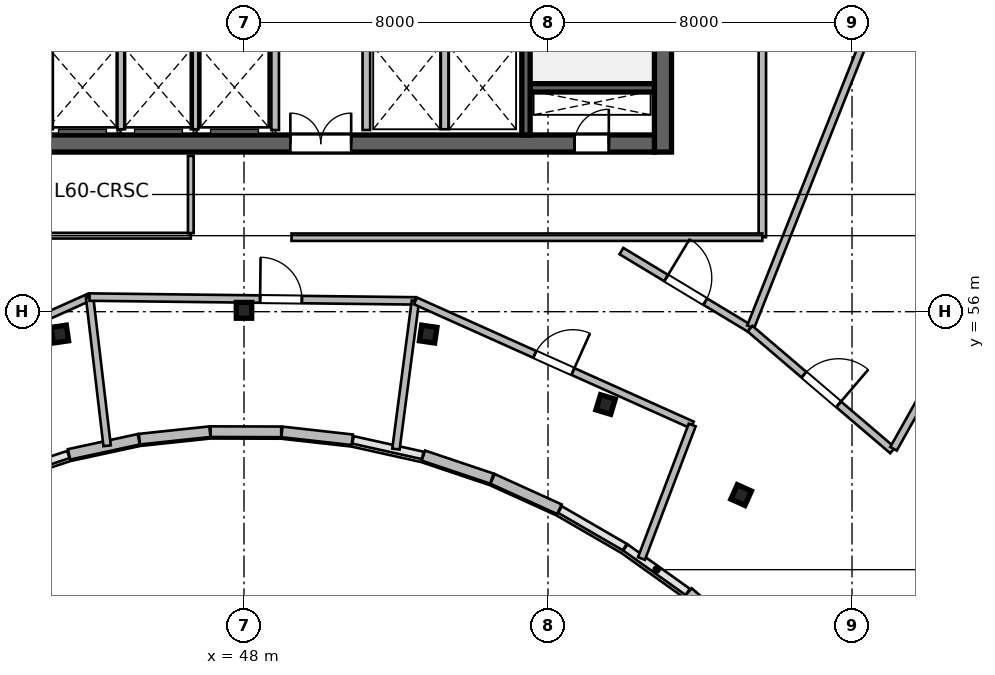
"""IFC4 building model, lengths in metres.
Left out: names, types, materials, properties, quantities, classifications, styles, units other than length and angle.
Written with IfcOpenShell. Run it as: python <this file> out.ifc"""

import sys

from ifc_helpers import new_model, si_unit, direction, frame, frame_2d, origin, origin_2d, place, context, subcontext, project, spatial, rectangle, i_section, extrude, source, transform, mapped, element, fill, save


model = new_model("IFC4")
c1 = context("Model", 3, precision=1e-05, world=origin(), true_north=direction((0.0, 1.0)))
c2 = subcontext(c1, "Body", "Model", "MODEL_VIEW")
j1 = project(units=[si_unit("LENGTHUNIT", "METRE"), si_unit("PLANEANGLEUNIT", "RADIAN")], contexts=[c1])
p1 = place(None, origin())
s1 = spatial("IfcSite", under=j1, at=p1, CompositionType="ELEMENT")
p2 = place(p1, origin())
s2 = spatial("IfcBuilding", under=s1, at=p2, CompositionType="ELEMENT")
p3 = place(p2, frame((0.0, 0.0, 246.9)))
s3 = spatial("IfcBuildingStorey", under=s2, at=p3, CompositionType="ELEMENT", Elevation=246.9)
m1 = source(origin(), c2, "Body", "SweptSolid", [
    extrude(rectangle(XDim=12.0, YDim=0.45, at=frame_2d((6.0, 0.0))), origin(), (0.0, 0.0, 1.0), 3.9),
])
p4 = place(p3, frame((59.025, 60.2, 0.0), z_axis=(0.0, 0.0, 1.0), x_axis=(0.0, 1.0, 0.0)))
e1 = element("IfcWall", 1, at=p4, inside=s3, PredefinedType="SHEAR", context=c2, shape_type="MappedRepresentation", body=[
    mapped(m1, transform((0.0, 0.0, 0.0), scale=1.0)),
])
m2 = source(origin(), c2, "Body", "SweptSolid", [
    extrude(rectangle(XDim=21.6, YDim=0.45, at=frame_2d((10.8, 0.0))), origin(), (0.0, 0.0, 1.0), 3.9),
])
p5 = place(p3, frame((37.2, 60.425, 0.0), z_axis=(0.0, 0.0, 1.0), x_axis=(1.0, 0.0, 0.0)))
e2 = element("IfcWall", 2, at=p5, inside=s3, PredefinedType="SHEAR", context=c2, shape_type="MappedRepresentation", body=[
    mapped(m2, transform((0.0, 0.0, 0.0), scale=1.0)),
])
p6 = place(p5, frame((1.1, 0.0, 0.0)))
e3 = element("IfcOpeningElement", 3, at=p6, cuts=e2, PredefinedType="OPENING", context=c2, shape_type="SweptSolid", body=[
    extrude(rectangle(XDim=1.15, YDim=2.15, at=frame_2d((0.575, 1.075))), frame((0.0, 0.235, 0.0), z_axis=(0.0, -1.0, 0.0), x_axis=(1.0, 0.0, 0.0)), (0.0, 0.0, 1.0), 0.47),
])
p7 = place(p5, frame((19.5, 0.0, 0.0)))
e4 = element("IfcOpeningElement", 4, at=p7, cuts=e2, PredefinedType="OPENING", context=c2, shape_type="SweptSolid", body=[
    extrude(rectangle(XDim=0.9, YDim=2.1, at=frame_2d((0.45, 1.05))), frame((0.0, 0.235, 0.0), z_axis=(0.0, -1.0, 0.0), x_axis=(1.0, 0.0, 0.0)), (0.0, 0.0, 1.0), 0.47),
])
p8 = place(p5, frame((12.02, 0.0, 0.0)))
e5 = element("IfcOpeningElement", 5, at=p8, cuts=e2, PredefinedType="OPENING", context=c2, shape_type="SweptSolid", body=[
    extrude(rectangle(XDim=1.6, YDim=2.15, at=frame_2d((0.8, 1.075))), frame((0.0, 0.235, 0.0), z_axis=(0.0, -1.0, 0.0), x_axis=(1.0, 0.0, 0.0)), (0.0, 0.0, 1.0), 0.47),
])
m3 = source(origin(), c2, "Body", "SweptSolid", [
    extrude(rectangle(XDim=3.27, YDim=0.22, at=frame_2d((1.635, 0.0))), origin(), (0.0, 0.0, 1.0), 3.9),
])
p9 = place(p3, frame((55.53, 61.89, 0.0), z_axis=(0.0, 0.0, 1.0), x_axis=(1.0, 0.0, 0.0)))
e6 = element("IfcWall", 6, at=p9, inside=s3, PredefinedType="SHEAR", context=c2, shape_type="MappedRepresentation", body=[
    mapped(m3, transform((0.0, 0.0, 0.0), scale=1.0)),
])
m4 = source(origin(), c2, "Body", "SweptSolid", [
    extrude(rectangle(XDim=11.1, YDim=0.22, at=frame_2d((5.55, 0.0))), origin(), (0.0, 0.0, 1.0), 3.9),
])
p10 = place(p3, frame((55.42, 60.65, 0.0), z_axis=(0.0, 0.0, 1.0), x_axis=(0.0, 1.0, 0.0)))
e7 = element("IfcWall", 7, at=p10, inside=s3, PredefinedType="SHEAR", context=c2, shape_type="MappedRepresentation", body=[
    mapped(m4, transform((0.0, 0.0, 0.0), scale=1.0)),
])
p11 = place(p10, frame((9.595, 0.0, 0.0)))
e8 = element("IfcOpeningElement", 8, at=p11, cuts=e7, PredefinedType="OPENING", context=c2, shape_type="SweptSolid", body=[
    extrude(rectangle(XDim=1.15, YDim=2.15, at=frame_2d((0.575, 1.075))), frame((0.0, 0.12, 0.0), z_axis=(0.0, -1.0, 0.0), x_axis=(1.0, 0.0, 0.0)), (0.0, 0.0, 1.0), 0.24),
])
m5 = source(origin(), c2, "Body", "SweptSolid", [
    extrude(i_section(OverallWidth=0.406, OverallDepth=0.416, WebThickness=0.03, FlangeThickness=0.048, at=origin_2d()), origin(), (0.0, 0.0, 1.0), 3.9),
])
for number, where, z_axis, x_axis in (
    (9, (43.154, 55.411, 0.0), (0.0, 0.0, 1.0), (-0.143, 0.99, 0.0)),
    (10, (48.0, 56.036, 0.0), (0.0, 0.0, 1.0), (0.0, 1.0, 0.0)),
    (11, (52.846, 55.411, 0.0), (0.0, 0.0, 1.0), (0.143, 0.99, 0.0)),
    (12, (57.515, 53.558, 0.0), (0.0, 0.0, 1.0), (0.289, 0.957, 0.0)),
    (13, (61.082, 51.175, 0.0), (0.0, 0.0, 1.0), (0.409, 0.912, 0.0)),
):
    element("IfcColumn", number, at=place(p3, frame(where, z_axis=z_axis, x_axis=x_axis)), inside=s3, PredefinedType="COLUMN", context=c2, shape_type="MappedRepresentation", body=[
        mapped(m5, transform((0.0, 0.0, 0.0), scale=1.0)),
    ])
m6 = source(origin(), c2, "Body", "SweptSolid", [
    extrude(rectangle(XDim=2.022, YDim=0.28, at=frame_2d((1.011, 0.0))), origin(), (0.0, 0.0, 1.0), 3.65),
])
p12 = place(p3, frame((61.222, 47.299, 0.0), z_axis=(0.0, 0.0, 1.0), x_axis=(-0.758343943716, 0.651854633358, 0.0)))
e14 = element("IfcWall", 14, at=p12, inside=s3, PredefinedType="SOLIDWALL", context=c2, shape_type="MappedRepresentation", body=[
    mapped(m6, transform((0.0, 0.0, 0.0), scale=1.0)),
])
m7 = source(origin(), c2, "Body", "SweptSolid", [
    extrude(rectangle(XDim=1.933, YDim=0.28, at=frame_2d((0.966, 0.0))), origin(), (0.0, 0.0, 1.0), 3.65),
])
p13 = place(p3, frame((56.3, 50.802, 0.0), z_axis=(0.0, 0.0, 1.0), x_axis=(-0.910478916145, 0.413555489936, 0.0)))
e15 = element("IfcWall", 15, at=p13, inside=s3, PredefinedType="SOLIDWALL", context=c2, shape_type="MappedRepresentation", body=[
    mapped(m7, transform((0.0, 0.0, 0.0), scale=1.0)),
])
m8 = source(origin(), c2, "Body", "SweptSolid", [
    extrude(rectangle(XDim=1.901, YDim=0.28, at=frame_2d((0.951, 0.0))), origin(), (0.0, 0.0, 1.0), 3.65),
])
p14 = place(p3, frame((54.523, 51.608, 0.0), z_axis=(0.0, 0.0, 1.0), x_axis=(-0.94793587841, 0.318461254194, 0.0)))
e16 = element("IfcWall", 16, at=p14, inside=s3, PredefinedType="SOLIDWALL", context=c2, shape_type="MappedRepresentation", body=[
    mapped(m8, transform((0.0, 0.0, 0.0), scale=1.0)),
])
m9 = source(origin(), c2, "Body", "SweptSolid", [
    extrude(rectangle(XDim=1.863, YDim=0.28, at=frame_2d((0.932, 0.0))), origin(), (0.0, 0.0, 1.0), 3.65),
])
p15 = place(p3, frame((50.851, 52.63, 0.0), z_axis=(0.0, 0.0, 1.0), x_axis=(-0.9937939307, 0.111236789343, 0.0)))
e17 = element("IfcWall", 17, at=p15, inside=s3, PredefinedType="SOLIDWALL", context=c2, shape_type="MappedRepresentation", body=[
    mapped(m9, transform((0.0, 0.0, 0.0), scale=1.0)),
])
m10 = source(origin(), c2, "Body", "SweptSolid", [
    extrude(rectangle(XDim=1.858, YDim=0.28, at=frame_2d((0.929, 0.0))), origin(), (0.0, 0.0, 1.0), 3.65),
])
p16 = place(p3, frame((48.979, 52.838, 0.0), z_axis=(0.0, 0.0, 1.0), x_axis=(-0.999995433965, 0.003021928128, 0.0)))
e18 = element("IfcWall", 18, at=p16, inside=s3, PredefinedType="SOLIDWALL", context=c2, shape_type="MappedRepresentation", body=[
    mapped(m10, transform((0.0, 0.0, 0.0), scale=1.0)),
])
m11 = source(origin(), c2, "Body", "SweptSolid", [
    extrude(rectangle(XDim=1.862, YDim=0.28, at=frame_2d((0.931, 0.0))), origin(), (0.0, 0.0, 1.0), 3.65),
])
p17 = place(p3, frame((47.102, 52.842, 0.0), z_axis=(0.0, 0.0, 1.0), x_axis=(-0.994430497743, -0.1053944266, 0.0)))
e19 = element("IfcWall", 19, at=p17, inside=s3, PredefinedType="SOLIDWALL", context=c2, shape_type="MappedRepresentation", body=[
    mapped(m11, transform((0.0, 0.0, 0.0), scale=1.0)),
])
m12 = source(origin(), c2, "Body", "SweptSolid", [
    extrude(rectangle(XDim=1.877, YDim=0.28, at=frame_2d((0.938, 0.0))), origin(), (0.0, 0.0, 1.0), 3.65),
])
p18 = place(p3, frame((45.231, 52.643, 0.0), z_axis=(0.0, 0.0, 1.0), x_axis=(-0.97737202312, -0.211527606761, 0.0)))
e20 = element("IfcWall", 20, at=p18, inside=s3, PredefinedType="SOLIDWALL", context=c2, shape_type="MappedRepresentation", body=[
    mapped(m12, transform((0.0, 0.0, 0.0), scale=1.0)),
])
m13 = source(origin(), c2, "Body", "SweptSolid", [
    extrude(rectangle(XDim=2.24, YDim=0.2, at=frame_2d((1.12, 0.0))), origin(), (0.0, 0.0, 1.0), 3.65),
])
for number, where, z_axis, x_axis in (
    (21, (48.82, 60.78, 0.0), (0.0, 0.0, 1.0), (0.0, 1.0, 0.0)),
    (22, (51.22, 60.78, 0.0), (0.0, 0.0, 1.0), (0.0, 1.0, 0.0)),
):
    element("IfcWall", number, at=place(p3, frame(where, z_axis=z_axis, x_axis=x_axis)), inside=s3, PredefinedType="SOLIDWALL", context=c2, shape_type="MappedRepresentation", body=[
        mapped(m13, transform((0.0, 0.0, 0.0), scale=1.0)),
    ])
m14 = source(origin(), c2, "Body", "SweptSolid", [
    extrude(rectangle(XDim=2.2, YDim=0.2, at=frame_2d((1.1, 0.0))), origin(), (0.0, 0.0, 1.0), 3.65),
])
for number, where, z_axis, x_axis in (
    (23, (42.87, 60.8, 0.0), (0.0, 0.0, 1.0), (0.0, 1.0, 0.0)),
    (24, (44.77, 60.8, 0.0), (0.0, 0.0, 1.0), (0.0, 1.0, 0.0)),
    (25, (46.7, 60.8, 0.0), (0.0, 0.0, 1.0), (0.0, 1.0, 0.0)),
    (26, (53.28, 60.8, 0.0), (0.0, 0.0, 1.0), (0.0, 1.0, 0.0)),
):
    element("IfcWall", number, at=place(p3, frame(where, z_axis=z_axis, x_axis=x_axis)), inside=s3, PredefinedType="SOLIDWALL", context=c2, shape_type="MappedRepresentation", body=[
        mapped(m14, transform((0.0, 0.0, 0.0), scale=1.0)),
    ])
m15 = source(origin(), c2, "Body", "SweptSolid", [
    extrude(rectangle(XDim=5.4, YDim=0.15, at=frame_2d((2.7, 0.0))), origin(), (0.0, 0.0, 1.0), 3.65),
])
p19 = place(p3, frame((41.2, 58.0, 0.0), z_axis=(0.0, 0.0, 1.0), x_axis=(1.0, 0.0, 0.0)))
e27 = element("IfcWall", 27, at=p19, inside=s3, PredefinedType="PARTITIONING", context=c2, shape_type="MappedRepresentation", body=[
    mapped(m15, transform((0.0, 0.0, 0.0), scale=1.0)),
])
m16 = source(origin(), c2, "Body", "SweptSolid", [
    extrude(rectangle(XDim=2.033, YDim=0.15, at=frame_2d((1.016, 0.0))), origin(), (0.0, 0.0, 1.0), 3.65),
])
p20 = place(p3, frame((46.6, 58.067, 0.0), z_axis=(0.0, 0.0, 1.0), x_axis=(0.0, 1.0, 0.0)))
e28 = element("IfcWall", 28, at=p20, inside=s3, PredefinedType="PARTITIONING", context=c2, shape_type="MappedRepresentation", body=[
    mapped(m16, transform((0.0, 0.0, 0.0), scale=1.0)),
])
m17 = source(origin(), c2, "Body", "SweptSolid", [
    extrude(rectangle(XDim=8.913, YDim=0.195, at=frame_2d((4.457, 0.0))), origin(), (0.0, 0.0, 1.0), 3.65),
])
p21 = place(p3, frame((35.803, 52.738, 0.0), z_axis=(0.0, 0.0, 1.0), x_axis=(0.912488521546, 0.409102307555, 0.0)))
e29 = element("IfcWall", 29, at=p21, inside=s3, PredefinedType="PARTITIONING", context=c2, shape_type="MappedRepresentation", body=[
    mapped(m17, transform((0.0, 0.0, 0.0), scale=1.0)),
])
p22 = place(p21, frame((3.906, 0.0, 0.0)))
e30 = element("IfcOpeningElement", 30, at=p22, cuts=e29, PredefinedType="OPENING", context=c2, shape_type="SweptSolid", body=[
    extrude(rectangle(XDim=1.1, YDim=2.15, at=frame_2d((0.55, 1.075))), frame((0.0, 0.107, 0.0), z_axis=(0.0, -1.0, 0.0), x_axis=(1.0, 0.0, 0.0)), (0.0, 0.0, 1.0), 0.215),
])
m18 = source(origin(), c2, "Body", "SweptSolid", [
    extrude(rectangle(XDim=3.939, YDim=0.195, at=frame_2d((1.969, 0.0))), origin(), (0.0, 0.0, 1.0), 3.65),
])
p23 = place(p3, frame((44.398, 52.473, 0.0), z_axis=(0.0, 0.0, 1.0), x_axis=(-0.117395053494, 0.993085294129, 0.0)))
e31 = element("IfcWall", 31, at=p23, inside=s3, PredefinedType="PARTITIONING", context=c2, shape_type="MappedRepresentation", body=[
    mapped(m18, transform((0.0, 0.0, 0.0), scale=1.0)),
])
m19 = source(origin(), c2, "Body", "SweptSolid", [
    extrude(rectangle(XDim=8.576, YDim=0.195, at=frame_2d((4.288, 0.0))), origin(), (0.0, 0.0, 1.0), 3.65),
])
p24 = place(p3, frame((43.936, 56.385, 0.0), z_axis=(0.0, 0.0, 1.0), x_axis=(0.999931553434, -0.011699933624, 0.0)))
e32 = element("IfcWall", 32, at=p24, inside=s3, PredefinedType="PARTITIONING", context=c2, shape_type="MappedRepresentation", body=[
    mapped(m19, transform((0.0, 0.0, 0.0), scale=1.0)),
])
p25 = place(p24, frame((4.488, 0.0, 0.0)))
e33 = element("IfcOpeningElement", 33, at=p25, cuts=e32, PredefinedType="OPENING", context=c2, shape_type="SweptSolid", body=[
    extrude(rectangle(XDim=1.1, YDim=2.15, at=frame_2d((0.55, 1.075))), frame((0.0, 0.107, 0.0), z_axis=(0.0, -1.0, 0.0), x_axis=(1.0, 0.0, 0.0)), (0.0, 0.0, 1.0), 0.215),
])
m20 = source(origin(), c2, "Body", "SweptSolid", [
    extrude(rectangle(XDim=3.932, YDim=0.195, at=frame_2d((1.966, 0.0))), origin(), (0.0, 0.0, 1.0), 3.65),
])
p26 = place(p3, frame((51.998, 52.385, 0.0), z_axis=(0.0, 0.0, 1.0), x_axis=(0.130504299366, 0.991447743377, 0.0)))
e34 = element("IfcWall", 34, at=p26, inside=s3, PredefinedType="PARTITIONING", context=c2, shape_type="MappedRepresentation", body=[
    mapped(m20, transform((0.0, 0.0, 0.0), scale=1.0)),
])
m21 = source(origin(), c2, "Body", "SweptSolid", [
    extrude(rectangle(XDim=7.982, YDim=0.195, at=frame_2d((3.991, 0.0))), origin(), (0.0, 0.0, 1.0), 3.65),
])
p27 = place(p3, frame((52.511, 56.284, 0.0), z_axis=(0.0, 0.0, 1.0), x_axis=(0.91248609472, -0.409107720464, 0.0)))
e35 = element("IfcWall", 35, at=p27, inside=s3, PredefinedType="PARTITIONING", context=c2, shape_type="MappedRepresentation", body=[
    mapped(m21, transform((0.0, 0.0, 0.0), scale=1.0)),
])
p28 = place(p27, frame((3.441, 0.0, 0.0)))
e36 = element("IfcOpeningElement", 36, at=p28, cuts=e35, PredefinedType="OPENING", context=c2, shape_type="SweptSolid", body=[
    extrude(rectangle(XDim=1.1, YDim=2.15, at=frame_2d((0.55, 1.075))), frame((0.0, 0.107, 0.0), z_axis=(0.0, -1.0, 0.0), x_axis=(1.0, 0.0, 0.0)), (0.0, 0.0, 1.0), 0.215),
])
m22 = source(origin(), c2, "Body", "SweptSolid", [
    extrude(rectangle(XDim=3.757, YDim=0.195, at=frame_2d((1.879, 0.0))), origin(), (0.0, 0.0, 1.0), 3.65),
])
p29 = place(p3, frame((58.459, 49.507, 0.0), z_axis=(0.0, 0.0, 1.0), x_axis=(0.355427833237, 0.93470372598, 0.0)))
e37 = element("IfcWall", 37, at=p29, inside=s3, PredefinedType="PARTITIONING", context=c2, shape_type="MappedRepresentation", body=[
    mapped(m22, transform((0.0, 0.0, 0.0), scale=1.0)),
])
m23 = source(origin(), c2, "Body", "SweptSolid", [
    extrude(rectangle(XDim=3.951, YDim=0.195, at=frame_2d((1.975, 0.0))), origin(), (0.0, 0.0, 1.0), 3.65),
])
p30 = place(p3, frame((57.932, 57.596, 0.0), z_axis=(0.0, 0.0, 1.0), x_axis=(0.856137696849, -0.51674775668, 0.0)))
e38 = element("IfcWall", 38, at=p30, inside=s3, PredefinedType="PARTITIONING", context=c2, shape_type="MappedRepresentation", body=[
    mapped(m23, transform((0.0, 0.0, 0.0), scale=1.0)),
])
p31 = place(p30, frame((1.375, 0.0, 0.0)))
e39 = element("IfcOpeningElement", 39, at=p31, cuts=e38, PredefinedType="OPENING", context=c2, shape_type="SweptSolid", body=[
    extrude(rectangle(XDim=1.2, YDim=2.15, at=frame_2d((0.6, 1.075))), frame((0.0, 0.107, 0.0), z_axis=(0.0, -1.0, 0.0), x_axis=(1.0, 0.0, 0.0)), (0.0, 0.0, 1.0), 0.215),
])
m24 = source(origin(), c2, "Body", "SweptSolid", [
    extrude(rectangle(XDim=18.471, YDim=0.195, at=frame_2d((9.235, 0.0))), origin(), (0.0, 0.0, 1.0), 3.65),
])
p32 = place(p3, frame((61.333, 55.602, 0.0), z_axis=(0.0, 0.0, 1.0), x_axis=(0.368827756565, 0.929497760076, 0.0)))
e40 = element("IfcWall", 40, at=p32, inside=s3, PredefinedType="PARTITIONING", context=c2, shape_type="MappedRepresentation", body=[
    mapped(m24, transform((0.0, 0.0, 0.0), scale=1.0)),
])
m25 = source(origin(), c2, "Body", "SweptSolid", [
    extrude(rectangle(XDim=4.935, YDim=0.195, at=frame_2d((2.467, 0.0))), origin(), (0.0, 0.0, 1.0), 3.65),
])
p33 = place(p3, frame((61.314, 55.554, 0.0), z_axis=(0.0, 0.0, 1.0), x_axis=(0.760547222161, -0.649282621716, 0.0)))
e41 = element("IfcWall", 41, at=p33, inside=s3, PredefinedType="PARTITIONING", context=c2, shape_type="MappedRepresentation", body=[
    mapped(m25, transform((0.0, 0.0, 0.0), scale=1.0)),
])
p34 = place(p33, frame((1.867, 0.0, 0.0)))
e42 = element("IfcOpeningElement", 42, at=p34, cuts=e41, PredefinedType="OPENING", context=c2, shape_type="SweptSolid", body=[
    extrude(rectangle(XDim=1.2, YDim=2.15, at=frame_2d((0.6, 1.075))), frame((0.0, 0.107, 0.0), z_axis=(0.0, -1.0, 0.0), x_axis=(1.0, 0.0, 0.0)), (0.0, 0.0, 1.0), 0.215),
])
m26 = source(origin(), c2, "Body", "SweptSolid", [
    extrude(rectangle(XDim=17.064, YDim=0.195, at=frame_2d((8.532, 0.0))), origin(), (0.0, 0.0, 1.0), 3.65),
])
p35 = place(p3, frame((65.092, 52.393, 0.0), z_axis=(0.0, 0.0, 1.0), x_axis=(0.490167496501, 0.871628261, 0.0)))
e43 = element("IfcWall", 43, at=p35, inside=s3, PredefinedType="PARTITIONING", context=c2, shape_type="MappedRepresentation", body=[
    mapped(m26, transform((0.0, 0.0, 0.0), scale=1.0)),
])
m27 = source(origin(), c2, "Body", "SweptSolid", [
    extrude(rectangle(XDim=18.567, YDim=0.195, at=frame_2d((9.284, 0.0))), origin(), (0.0, 0.0, 1.0), 3.65),
])
p36 = place(p3, frame((61.64, 57.96, 0.0), z_axis=(0.0, 0.0, 1.0), x_axis=(0.0, 1.0, 0.0)))
e44 = element("IfcWall", 44, at=p36, inside=s3, PredefinedType="PARTITIONING", context=c2, shape_type="MappedRepresentation", body=[
    mapped(m27, transform((0.0, 0.0, 0.0), scale=1.0)),
])
m28 = source(origin(), c2, "Body", "SweptSolid", [
    extrude(rectangle(XDim=12.39, YDim=0.195, at=frame_2d((6.195, 0.0))), origin(), (0.0, 0.0, 1.0), 3.65),
])
p37 = place(p3, frame((49.25, 57.96, 0.0), z_axis=(0.0, 0.0, 1.0), x_axis=(1.0, 0.0, 0.0)))
e45 = element("IfcWall", 45, at=p37, inside=s3, PredefinedType="PARTITIONING", context=c2, shape_type="MappedRepresentation", body=[
    mapped(m28, transform((0.0, 0.0, 0.0), scale=1.0)),
])
m29 = source(origin(), c2, "Body", "SweptSolid", [
    extrude(rectangle(XDim=0.9, YDim=2.1, at=frame_2d((0.45, 1.05))), frame((0.0, 0.025, 0.0), z_axis=(0.0, -1.0, 0.0), x_axis=(1.0, 0.0, 0.0)), (0.0, 0.0, 1.0), 0.05),
])
p38 = place(p7, origin())
e46 = element("IfcDoor", 46, at=p38, inside=s3, OperationType="SINGLE_SWING_RIGHT", PredefinedType="DOOR", context=c2, shape_type="MappedRepresentation", body=[
    mapped(m29, transform((0.0, 0.0, 0.0), scale=1.0)),
])
fill(e4, e46)
m30 = source(origin(), c2, "Body", "SweptSolid", [
    extrude(rectangle(XDim=1.6, YDim=2.15, at=frame_2d((0.8, 1.075))), frame((0.0, 0.025, 0.0), z_axis=(0.0, -1.0, 0.0), x_axis=(1.0, 0.0, 0.0)), (0.0, 0.0, 1.0), 0.05),
])
p39 = place(p8, origin())
e47 = element("IfcDoor", 47, at=p39, inside=s3, OperationType="DOUBLE_DOOR_SINGLE_SWING", PredefinedType="DOOR", context=c2, shape_type="MappedRepresentation", body=[
    mapped(m30, transform((0.0, 0.0, 0.0), scale=1.0)),
])
fill(e5, e47)
m31 = source(origin(), c2, "Body", "SweptSolid", [
    extrude(rectangle(XDim=1.1, YDim=2.15, at=frame_2d((0.55, 1.075))), frame((0.0, 0.025, 0.0), z_axis=(0.0, -1.0, 0.0), x_axis=(1.0, 0.0, 0.0)), (0.0, 0.0, 1.0), 0.05),
])
p40 = place(p25, origin())
e48 = element("IfcDoor", 48, at=p40, inside=s3, OperationType="SINGLE_SWING_LEFT", PredefinedType="DOOR", context=c2, shape_type="MappedRepresentation", body=[
    mapped(m31, transform((0.0, 0.0, 0.0), scale=1.0)),
])
fill(e33, e48)
p41 = place(p28, origin())
e49 = element("IfcDoor", 49, at=p41, inside=s3, OperationType="SINGLE_SWING_RIGHT", PredefinedType="DOOR", context=c2, shape_type="MappedRepresentation", body=[
    mapped(m31, transform((0.0, 0.0, 0.0), scale=1.0)),
])
fill(e36, e49)
m32 = source(origin(), c2, "Body", "SweptSolid", [
    extrude(rectangle(XDim=1.2, YDim=2.15, at=frame_2d((0.6, 1.075))), frame((0.0, 0.025, 0.0), z_axis=(0.0, -1.0, 0.0), x_axis=(1.0, 0.0, 0.0)), (0.0, 0.0, 1.0), 0.05),
])
p42 = place(p31, origin())
e50 = element("IfcDoor", 50, at=p42, inside=s3, OperationType="SINGLE_SWING_LEFT", PredefinedType="DOOR", context=c2, shape_type="MappedRepresentation", body=[
    mapped(m32, transform((0.0, 0.0, 0.0), scale=1.0)),
])
fill(e39, e50)
p43 = place(p34, origin())
e51 = element("IfcDoor", 51, at=p43, inside=s3, OperationType="SINGLE_SWING_RIGHT", PredefinedType="DOOR", context=c2, shape_type="MappedRepresentation", body=[
    mapped(m32, transform((0.0, 0.0, 0.0), scale=1.0)),
])
fill(e42, e51)
save(model, sys.argv[1])
